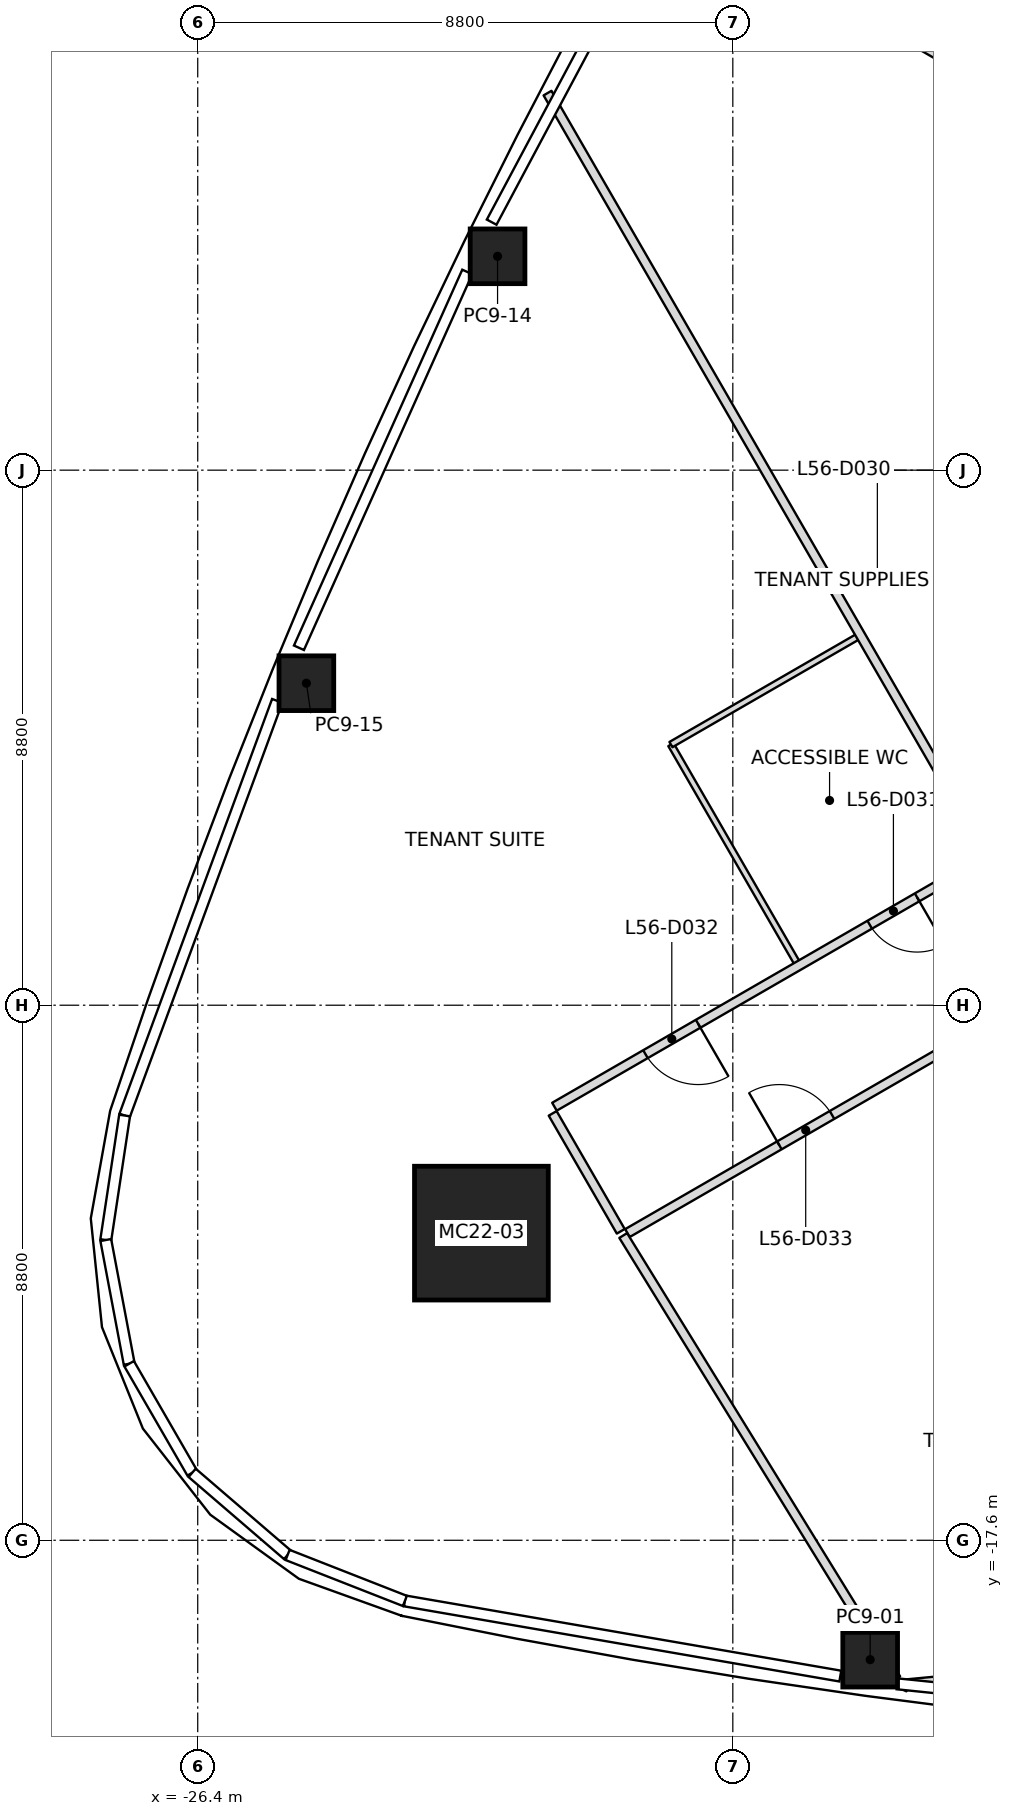
"""IFC4 building model, lengths in metres.
Left out: names, types, materials, properties, quantities, classifications, styles, units other than length and angle.
Written with IfcOpenShell. Run it as: python <this file> out.ifc"""

import sys

from ifc_helpers import new_model, si_unit, direction, frame, frame_2d, origin, origin_2d, place, context, subcontext, project, spatial, rectangle, extrude, element, fill, save


model = new_model("IFC4")
c1 = context("Model", 3, precision=1e-05, world=origin(), true_north=direction((0.0, 1.0)))
c2 = subcontext(c1, "Body", "Model", "MODEL_VIEW")
j1 = project(units=[si_unit("LENGTHUNIT", "METRE"), si_unit("PLANEANGLEUNIT", "RADIAN")], contexts=[c1])
p1 = place(None, origin())
s1 = spatial("IfcSite", under=j1, at=p1, CompositionType="ELEMENT")
p2 = place(p1, origin())
s2 = spatial("IfcBuilding", under=s1, at=p2, CompositionType="ELEMENT")
p3 = place(p2, frame((0.0, 0.0, 251.0)))
s3 = spatial("IfcBuildingStorey", under=s2, at=p3, CompositionType="ELEMENT", Elevation=251.0)
p4 = place(p3, frame((-21.735, -12.549, 0.0), z_axis=(0.027817649629, 0.016104955049, 0.999483270892), x_axis=(0.999613014306, -0.000448175434, -0.027814039075)))
e1 = element("IfcColumn", 1, at=p4, inside=s3, PredefinedType="COLUMN", context=c2, shape_type="SweptSolid", body=[
    extrude(rectangle(XDim=2.2, YDim=2.2, at=origin_2d()), origin(), (0.0, 0.0, 1.0), 4.002),
])
p5 = place(p3, frame((-15.341, -19.564, 0.0), z_axis=(0.017513449354, 0.010434842647, 0.99979217498), x_axis=(-0.990510670136, 0.136509968216, 0.015926108262)))
e2 = element("IfcColumn", 2, at=p5, inside=s3, PredefinedType="COLUMN", context=c2, shape_type="SweptSolid", body=[
    extrude(rectangle(XDim=0.9, YDim=0.9, at=origin_2d()), origin(), (0.0, 0.0, 1.0), 4.001),
])
p6 = place(p3, frame((-21.469, 3.517, 0.0), z_axis=(0.014036674448, 0.002013957638, 0.999899452818), x_axis=(0.439615277351, 0.898150723159, -0.007980376444)))
e3 = element("IfcColumn", 3, at=p6, inside=s3, PredefinedType="COLUMN", context=c2, shape_type="SweptSolid", body=[
    extrude(rectangle(XDim=0.9, YDim=0.9, at=origin_2d()), origin(), (0.0, 0.0, 1.0), 4.0),
])
p7 = place(p3, frame((-24.613, -3.504, 0.0), z_axis=(0.017757551143, 0.009946669541, 0.999792845115), x_axis=(0.377201101393, 0.925994674121, -0.015912027123)))
e4 = element("IfcColumn", 4, at=p7, inside=s3, PredefinedType="COLUMN", context=c2, shape_type="SweptSolid", body=[
    extrude(rectangle(XDim=0.9, YDim=0.9, at=origin_2d()), origin(), (0.0, 0.0, 1.0), 4.001),
])
p8 = place(p3, frame((-13.4, -6.351, 0.0), z_axis=(0.0, 0.0, 1.0), x_axis=(-0.500014063744, 0.866017283926, 0.0)))
e5 = element("IfcWall", 5, at=p8, inside=s3, PredefinedType="PARTITIONING", context=c2, shape_type="SweptSolid", body=[
    extrude(rectangle(XDim=14.494, YDim=0.15, at=frame_2d((7.247, 0.0))), origin(), (0.0, 0.0, 1.0), 3.234),
])
p9 = place(p3, frame((-19.403, -12.588, 0.0), z_axis=(0.0, 0.0, 1.0), x_axis=(0.524407622251, -0.851467348596, 0.0)))
e6 = element("IfcWall", 6, at=p9, inside=s3, PredefinedType="PARTITIONING", context=c2, shape_type="SweptSolid", body=[
    extrude(rectangle(XDim=8.562, YDim=0.15, at=frame_2d((4.281, 0.0))), origin(), (0.0, 0.0, 1.0), 3.45),
])
p10 = place(p3, frame((-9.2, -19.434, 0.0), z_axis=(0.0, 0.0, 1.0), x_axis=(-0.995486828172, -0.094899815256, 0.0)))
e7 = element("IfcWall", 7, at=p10, inside=s3, PredefinedType="PARTITIONING", context=c2, shape_type="SweptSolid", body=[
    extrude(rectangle(XDim=5.588, YDim=0.15, at=frame_2d((2.794, 0.0))), origin(), (0.0, 0.0, 1.0), 3.234),
])
p11 = place(p3, frame((-14.812, -20.051, 0.0), z_axis=(0.0, 0.0, 1.0), x_axis=(0.448990893469, 0.893536332547, 0.0)))
e8 = element("IfcWall", 8, at=p11, inside=s3, PredefinedType="PARTITIONING", context=c2, shape_type="SweptSolid", body=[
    extrude(rectangle(XDim=0.11, YDim=0.15, at=frame_2d((0.055, 0.0))), origin(), (0.0, 0.0, 1.0), 3.45),
])
p12 = place(p3, frame((-20.562, -10.579, 0.0), z_axis=(0.0, 0.0, 1.0), x_axis=(0.49994888933, -0.866054910533, 0.0)))
e9 = element("IfcWall", 9, at=p12, inside=s3, PredefinedType="PARTITIONING", context=c2, shape_type="SweptSolid", body=[
    extrude(rectangle(XDim=2.24, YDim=0.15, at=frame_2d((1.12, 0.0))), origin(), (0.0, 0.0, 1.0), 3.233),
])
p13 = place(p3, frame((-13.4, -6.351, 0.0), z_axis=(0.0, 0.0, 1.0), x_axis=(-0.866025662596, -0.499999551726, 0.0)))
e10 = element("IfcWall", 10, at=p13, inside=s3, PredefinedType="PARTITIONING", context=c2, shape_type="SweptSolid", body=[
    extrude(rectangle(XDim=8.237, YDim=0.15, at=frame_2d((4.118, 0.0))), origin(), (0.0, 0.0, 1.0), 3.317),
])
p14 = place(p13, frame((1.35, 0.0, 0.0)))
e11 = element("IfcOpeningElement", 11, at=p14, cuts=e10, PredefinedType="OPENING", context=c2, shape_type="SweptSolid", body=[
    extrude(rectangle(XDim=0.9, YDim=2.1, at=frame_2d((0.45, 1.05))), frame((0.0, 0.075, 0.0), z_axis=(0.0, -1.0, 0.0), x_axis=(1.0, 0.0, 0.0)), (0.0, 0.0, 1.0), 0.15),
])
p15 = place(p13, frame((5.509, 0.0, 0.0)))
e12 = element("IfcOpeningElement", 12, at=p15, cuts=e10, PredefinedType="OPENING", context=c2, shape_type="SweptSolid", body=[
    extrude(rectangle(XDim=1.0, YDim=2.1, at=frame_2d((0.5, 1.05))), frame((0.0, 0.075, 0.0), z_axis=(0.0, -1.0, 0.0), x_axis=(1.0, 0.0, 0.0)), (0.0, 0.0, 1.0), 0.15),
])
p16 = place(p3, frame((-19.333, -12.548, 0.0), z_axis=(0.0, 0.0, 1.0), x_axis=(0.866030705461, 0.499990817114, 0.0)))
e13 = element("IfcWall", 13, at=p16, inside=s3, PredefinedType="PARTITIONING", context=c2, shape_type="SweptSolid", body=[
    extrude(rectangle(XDim=6.851, YDim=0.15, at=frame_2d((3.426, 0.0))), origin(), (0.0, 0.0, 1.0), 3.233),
])
p17 = place(p16, frame((2.885, 0.0, 0.0)))
e14 = element("IfcOpeningElement", 14, at=p17, cuts=e13, PredefinedType="OPENING", context=c2, shape_type="SweptSolid", body=[
    extrude(rectangle(XDim=1.0, YDim=2.1, at=frame_2d((0.5, 1.05))), frame((0.0, 0.075, 0.0), z_axis=(0.0, -1.0, 0.0), x_axis=(1.0, 0.0, 0.0)), (0.0, 0.0, 1.0), 0.15),
])
p18 = place(p3, frame((-17.361, 8.638, 0.0), z_axis=(0.0, 0.0, 1.0), x_axis=(0.866027379035, -0.49999657875, 0.0)))
e15 = element("IfcWall", 15, at=p18, inside=s3, PredefinedType="PARTITIONING", context=c2, shape_type="SweptSolid", body=[
    extrude(rectangle(XDim=4.574, YDim=0.15, at=frame_2d((2.287, 0.0))), origin(), (0.0, 0.0, 1.0), 3.45),
])
p19 = place(p3, frame((-16.533, -8.125, 0.0), z_axis=(0.0, 0.0, 1.0), x_axis=(-0.499967396439, 0.866044226641, 0.0)))
e16 = element("IfcWall", 16, at=p19, inside=s3, PredefinedType="PARTITIONING", context=c2, shape_type="SweptSolid", body=[
    extrude(rectangle(XDim=4.17, YDim=0.1, at=frame_2d((2.085, 0.0))), origin(), (0.0, 0.0, 1.0), 3.317),
])
p20 = place(p3, frame((-18.618, -4.513, 0.0), z_axis=(0.0, 0.0, 1.0), x_axis=(0.866042098853, 0.499971082179, 0.0)))
e17 = element("IfcWall", 17, at=p20, inside=s3, PredefinedType="PARTITIONING", context=c2, shape_type="SweptSolid", body=[
    extrude(rectangle(XDim=3.57, YDim=0.1, at=frame_2d((1.785, 0.0))), origin(), (0.0, 0.0, 1.0), 3.317),
])
p21 = place(p14, origin())
e18 = element("IfcDoor", 18, at=p21, inside=s3, OperationType="SINGLE_SWING_RIGHT", PredefinedType="DOOR", context=c2, shape_type="SweptSolid", body=[
    extrude(rectangle(XDim=0.9, YDim=2.1, at=frame_2d((0.45, 1.05))), frame((0.0, 0.025, 0.0), z_axis=(0.0, -1.0, 0.0), x_axis=(1.0, 0.0, 0.0)), (0.0, 0.0, 1.0), 0.05),
])
fill(e11, e18)
p22 = place(p15, origin())
e19 = element("IfcDoor", 19, at=p22, inside=s3, OperationType="SINGLE_SWING_LEFT", PredefinedType="DOOR", context=c2, shape_type="SweptSolid", body=[
    extrude(rectangle(XDim=1.0, YDim=2.1, at=frame_2d((0.5, 1.05))), frame((0.0, 0.025, 0.0), z_axis=(0.0, -1.0, 0.0), x_axis=(1.0, 0.0, 0.0)), (0.0, 0.0, 1.0), 0.05),
])
fill(e12, e19)
p23 = place(p17, origin())
e20 = element("IfcDoor", 20, at=p23, inside=s3, OperationType="SINGLE_SWING_LEFT", PredefinedType="DOOR", context=c2, shape_type="SweptSolid", body=[
    extrude(rectangle(XDim=1.0, YDim=2.1, at=frame_2d((0.5, 1.05))), frame((0.0, 0.025, 0.0), z_axis=(0.0, -1.0, 0.0), x_axis=(1.0, 0.0, 0.0)), (0.0, 0.0, 1.0), 0.05),
])
fill(e14, e20)
save(model, sys.argv[1])
